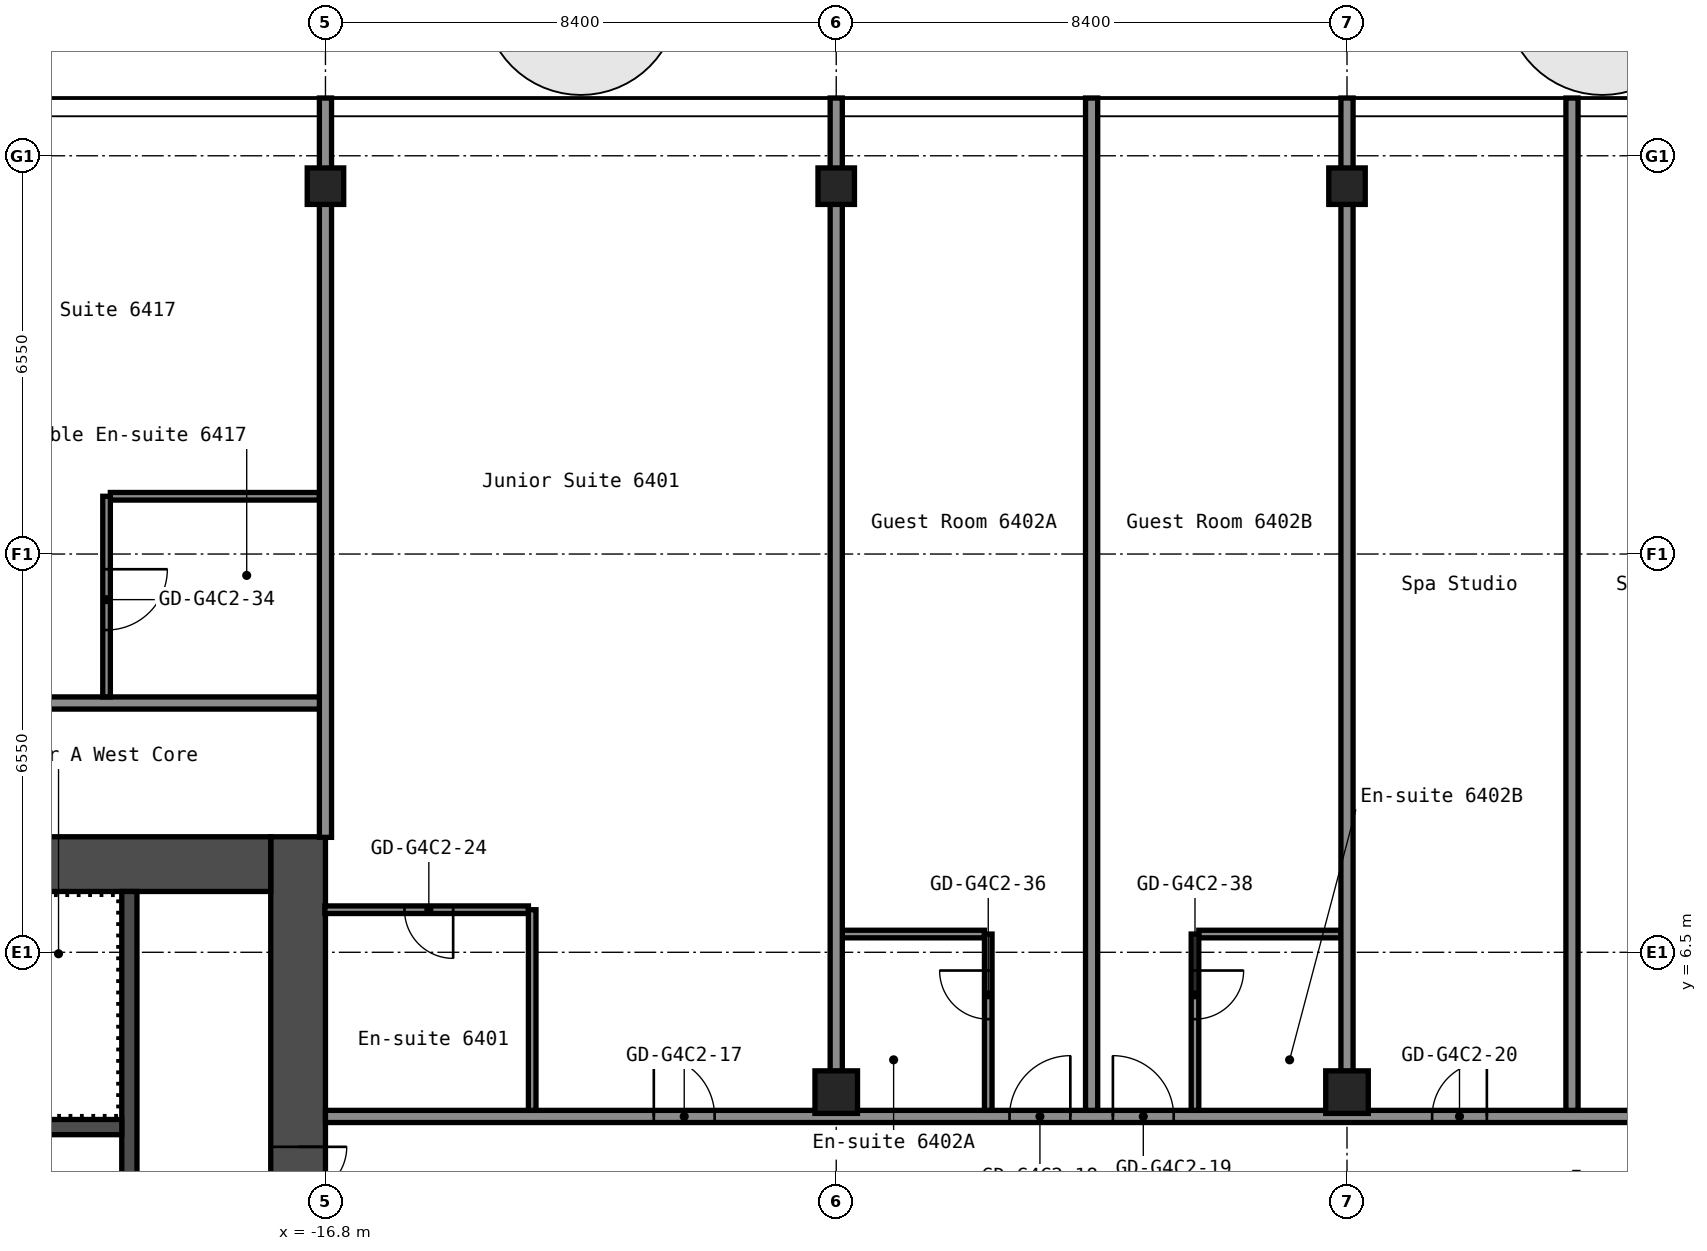
"""IFC4 building model, lengths in metres.
Left out: names, types, materials, properties, quantities, classifications, styles, units other than length and angle.
Written with IfcOpenShell. Run it as: python <this file> out.ifc"""

import sys

from ifc_helpers import new_model, si_unit, direction, frame, frame_2d, origin, origin_2d, place, context, subcontext, project, spatial, rectangle, hollow_rectangle, extrude, element, fill, save


model = new_model("IFC4")
c1 = context("Model", 3, precision=1e-05, world=origin(), true_north=direction((0.0, 1.0)))
c2 = subcontext(c1, "Body", "Model", "MODEL_VIEW")
j1 = project(units=[si_unit("LENGTHUNIT", "METRE"), si_unit("PLANEANGLEUNIT", "RADIAN")], contexts=[c1])
p1 = place(None, origin())
s1 = spatial("IfcSite", under=j1, at=p1, CompositionType="ELEMENT")
p2 = place(p1, origin())
s2 = spatial("IfcBuilding", under=s1, at=p2, CompositionType="ELEMENT")
p3 = place(p2, frame((0.0, 0.0, 225.0)))
s3 = spatial("IfcBuildingStorey", under=s2, at=p3, CompositionType="ELEMENT", Elevation=225.0)
p4 = place(p3, frame((-16.8, 19.1, 0.0), z_axis=(0.0, 0.0, 1.0), x_axis=(1.0, 0.0, 0.0)))
e1 = element("IfcColumn", 1, at=p4, inside=s3, PredefinedType="COLUMN", context=c2, shape_type="SweptSolid", body=[
    extrude(hollow_rectangle(XDim=0.6, YDim=0.6, WallThickness=0.025, InnerFilletRadius=0.038, OuterFilletRadius=0.062, at=origin_2d()), origin(), (0.0, 0.0, 1.0), 2.9),
])
p5 = place(p3, frame((-8.4, 4.2, 0.0), z_axis=(0.0, 0.0, 1.0), x_axis=(1.0, 0.0, 0.0)))
e2 = element("IfcColumn", 2, at=p5, inside=s3, PredefinedType="COLUMN", context=c2, shape_type="SweptSolid", body=[
    extrude(hollow_rectangle(XDim=0.7, YDim=0.7, WallThickness=0.028, at=origin_2d()), origin(), (0.0, 0.0, 1.0), 2.9),
])
p6 = place(p3, frame((-8.4, 19.1, 0.0), z_axis=(0.0, 0.0, 1.0), x_axis=(1.0, 0.0, 0.0)))
e3 = element("IfcColumn", 3, at=p6, inside=s3, PredefinedType="COLUMN", context=c2, shape_type="SweptSolid", body=[
    extrude(hollow_rectangle(XDim=0.6, YDim=0.6, WallThickness=0.025, InnerFilletRadius=0.038, OuterFilletRadius=0.062, at=origin_2d()), origin(), (0.0, 0.0, 1.0), 2.9),
])
p7 = place(p3, frame((0.0, 4.2, 0.0), z_axis=(0.0, 0.0, 1.0), x_axis=(1.0, 0.0, 0.0)))
e4 = element("IfcColumn", 4, at=p7, inside=s3, PredefinedType="COLUMN", context=c2, shape_type="SweptSolid", body=[
    extrude(hollow_rectangle(XDim=0.7, YDim=0.7, WallThickness=0.028, at=origin_2d()), origin(), (0.0, 0.0, 1.0), 2.9),
])
p8 = place(p3, frame((0.0, 19.1, 0.0), z_axis=(0.0, 0.0, 1.0), x_axis=(1.0, 0.0, 0.0)))
e5 = element("IfcColumn", 5, at=p8, inside=s3, PredefinedType="COLUMN", context=c2, shape_type="SweptSolid", body=[
    extrude(hollow_rectangle(XDim=0.6, YDim=0.6, WallThickness=0.025, InnerFilletRadius=0.038, OuterFilletRadius=0.062, at=origin_2d()), origin(), (0.0, 0.0, 1.0), 2.9),
])
p9 = place(p3, frame((-17.25, -8.4, 0.0), z_axis=(0.0, 0.0, 1.0), x_axis=(0.0, 1.0, 0.0)))
e6 = element("IfcWall", 6, at=p9, inside=s3, PredefinedType="SHEAR", context=c2, shape_type="SweptSolid", body=[
    extrude(rectangle(XDim=16.8, YDim=0.9, at=frame_2d((8.4, 0.0))), origin(), (0.0, 0.0, 1.0), 2.9),
])
p10 = place(p9, frame((10.1, 0.0, 0.0)))
e7 = element("IfcOpeningElement", 7, at=p10, cuts=e6, PredefinedType="OPENING", context=c2, shape_type="SweptSolid", body=[
    extrude(rectangle(XDim=1.6, YDim=2.1, at=frame_2d((0.8, 1.05))), frame((0.0, 0.46, 0.0), z_axis=(0.0, -1.0, 0.0), x_axis=(1.0, 0.0, 0.0)), (0.0, 0.0, 1.0), 0.92),
])
p11 = place(p3, frame((-32.7, 7.95, 0.0), z_axis=(0.0, 0.0, 1.0), x_axis=(1.0, 0.0, 0.0)))
e8 = element("IfcWall", 8, at=p11, inside=s3, PredefinedType="SHEAR", context=c2, shape_type="SweptSolid", body=[
    extrude(rectangle(XDim=15.0, YDim=0.9, at=frame_2d((7.5, 0.0))), origin(), (0.0, 0.0, 1.0), 2.9),
])
p12 = place(p11, frame((3.4, 0.0, 0.0)))
e9 = element("IfcOpeningElement", 9, at=p12, cuts=e8, PredefinedType="OPENING", context=c2, shape_type="SweptSolid", body=[
    extrude(rectangle(XDim=1.2, YDim=2.1, at=frame_2d((0.6, 1.05))), frame((0.0, 0.46, 0.0), z_axis=(0.0, -1.0, 0.0), x_axis=(1.0, 0.0, 0.0)), (0.0, 0.0, 1.0), 0.92),
])
p13 = place(p11, frame((0.75, 0.0, 0.0)))
e10 = element("IfcOpeningElement", 10, at=p13, cuts=e8, PredefinedType="OPENING", context=c2, shape_type="SweptSolid", body=[
    extrude(rectangle(XDim=0.9, YDim=2.1, at=frame_2d((0.45, 1.05))), frame((0.0, 0.46, 0.0), z_axis=(0.0, -1.0, 0.0), x_axis=(1.0, 0.0, 0.0)), (0.0, 0.0, 1.0), 0.92),
])
p14 = place(p3, frame((-20.025, 1.2, 0.0), z_axis=(0.0, 0.0, 1.0), x_axis=(0.0, 1.0, 0.0)))
e11 = element("IfcWall", 11, at=p14, inside=s3, PredefinedType="SHEAR", context=c2, shape_type="SweptSolid", body=[
    extrude(rectangle(XDim=6.3, YDim=0.25, at=frame_2d((3.15, 0.0))), origin(), (0.0, 0.0, 1.0), 2.9),
])
p15 = place(p3, frame((-27.65, 3.625, 0.0), z_axis=(0.0, 0.0, 1.0), x_axis=(1.0, 0.0, 0.0)))
e12 = element("IfcWall", 12, at=p15, inside=s3, PredefinedType="SHEAR", context=c2, shape_type="SweptSolid", body=[
    extrude(rectangle(XDim=7.5, YDim=0.25, at=frame_2d((3.75, 0.0))), origin(), (0.0, 0.0, 1.0), 2.9),
])
p16 = place(p3, frame((-16.8, 3.8, 0.0), z_axis=(0.0, 0.0, 1.0), x_axis=(1.0, 0.0, 0.0)))
e13 = element("IfcWall", 13, at=p16, inside=s3, PredefinedType="PARTITIONING", context=c2, shape_type="SweptSolid", body=[
    extrude(rectangle(XDim=33.6, YDim=0.2, at=frame_2d((16.8, 0.0))), origin(), (0.0, 0.0, 1.0), 2.9),
])
p17 = place(p16, frame((5.4, 0.0, 0.0)))
e14 = element("IfcOpeningElement", 14, at=p17, cuts=e13, PredefinedType="OPENING", context=c2, shape_type="SweptSolid", body=[
    extrude(rectangle(XDim=1.0, YDim=2.1, at=frame_2d((0.5, 1.05))), frame((0.0, 0.11, 0.0), z_axis=(0.0, -1.0, 0.0), x_axis=(1.0, 0.0, 0.0)), (0.0, 0.0, 1.0), 0.22),
])
p18 = place(p16, frame((11.25, 0.0, 0.0)))
e15 = element("IfcOpeningElement", 15, at=p18, cuts=e13, PredefinedType="OPENING", context=c2, shape_type="SweptSolid", body=[
    extrude(rectangle(XDim=1.0, YDim=2.1, at=frame_2d((0.5, 1.05))), frame((0.0, 0.11, 0.0), z_axis=(0.0, -1.0, 0.0), x_axis=(1.0, 0.0, 0.0)), (0.0, 0.0, 1.0), 0.22),
])
p19 = place(p16, frame((12.95, 0.0, 0.0)))
e16 = element("IfcOpeningElement", 16, at=p19, cuts=e13, PredefinedType="OPENING", context=c2, shape_type="SweptSolid", body=[
    extrude(rectangle(XDim=1.0, YDim=2.1, at=frame_2d((0.5, 1.05))), frame((0.0, 0.11, 0.0), z_axis=(0.0, -1.0, 0.0), x_axis=(1.0, 0.0, 0.0)), (0.0, 0.0, 1.0), 0.22),
])
p20 = place(p16, frame((18.2, 0.0, 0.0)))
e17 = element("IfcOpeningElement", 17, at=p20, cuts=e13, PredefinedType="OPENING", context=c2, shape_type="SweptSolid", body=[
    extrude(rectangle(XDim=0.9, YDim=2.1, at=frame_2d((0.45, 1.05))), frame((0.0, 0.11, 0.0), z_axis=(0.0, -1.0, 0.0), x_axis=(1.0, 0.0, 0.0)), (0.0, 0.0, 1.0), 0.22),
])
p21 = place(p16, frame((22.4, 0.0, 0.0)))
e18 = element("IfcOpeningElement", 18, at=p21, cuts=e13, PredefinedType="OPENING", context=c2, shape_type="SweptSolid", body=[
    extrude(rectangle(XDim=0.9, YDim=2.1, at=frame_2d((0.45, 1.05))), frame((0.0, 0.11, 0.0), z_axis=(0.0, -1.0, 0.0), x_axis=(1.0, 0.0, 0.0)), (0.0, 0.0, 1.0), 0.22),
])
p22 = place(p16, frame((28.05, 0.0, 0.0)))
e19 = element("IfcOpeningElement", 19, at=p22, cuts=e13, PredefinedType="OPENING", context=c2, shape_type="SweptSolid", body=[
    extrude(rectangle(XDim=1.0, YDim=2.1, at=frame_2d((0.5, 1.05))), frame((0.0, 0.11, 0.0), z_axis=(0.0, -1.0, 0.0), x_axis=(1.0, 0.0, 0.0)), (0.0, 0.0, 1.0), 0.22),
])
p23 = place(p16, frame((29.75, 0.0, 0.0)))
e20 = element("IfcOpeningElement", 20, at=p23, cuts=e13, PredefinedType="OPENING", context=c2, shape_type="SweptSolid", body=[
    extrude(rectangle(XDim=1.0, YDim=2.1, at=frame_2d((0.5, 1.05))), frame((0.0, 0.11, 0.0), z_axis=(0.0, -1.0, 0.0), x_axis=(1.0, 0.0, 0.0)), (0.0, 0.0, 1.0), 0.22),
])
p24 = place(p3, frame((-8.3, 6.8, 0.0), z_axis=(0.0, 0.0, 1.0), x_axis=(1.0, 0.0, 0.0)))
e21 = element("IfcWall", 21, at=p24, inside=s3, PredefinedType="PARTITIONING", context=c2, shape_type="SweptSolid", body=[
    extrude(rectangle(XDim=2.338, YDim=0.125, at=frame_2d((1.169, 0.0))), origin(), (0.0, 0.0, 1.0), 2.9),
])
p25 = place(p3, frame((-2.438, 6.8, 0.0), z_axis=(0.0, 0.0, 1.0), x_axis=(1.0, 0.0, 0.0)))
e22 = element("IfcWall", 22, at=p25, inside=s3, PredefinedType="PARTITIONING", context=c2, shape_type="SweptSolid", body=[
    extrude(rectangle(XDim=2.337, YDim=0.125, at=frame_2d((1.169, 0.0))), origin(), (0.0, 0.0, 1.0), 2.9),
])
p26 = place(p3, frame((-16.81, 7.2, 0.0), z_axis=(0.0, 0.0, 1.0), x_axis=(1.0, 0.0, 0.0)))
e23 = element("IfcWall", 23, at=p26, inside=s3, PredefinedType="PARTITIONING", context=c2, shape_type="SweptSolid", body=[
    extrude(rectangle(XDim=3.348, YDim=0.125, at=frame_2d((1.674, 0.0))), origin(), (0.0, 0.0, 1.0), 2.9),
])
p27 = place(p26, frame((1.31, 0.0, 0.0)))
e24 = element("IfcOpeningElement", 24, at=p27, cuts=e23, PredefinedType="OPENING", context=c2, shape_type="SweptSolid", body=[
    extrude(rectangle(XDim=0.8, YDim=2.1, at=frame_2d((0.4, 1.05))), frame((0.0, 0.073, 0.0), z_axis=(0.0, -1.0, 0.0), x_axis=(1.0, 0.0, 0.0)), (0.0, 0.0, 1.0), 0.145),
])
p28 = place(p3, frame((-38.1, 10.6, 0.0), z_axis=(0.0, 0.0, 1.0), x_axis=(1.0, 0.0, 0.0)))
e25 = element("IfcWall", 25, at=p28, inside=s3, PredefinedType="PARTITIONING", context=c2, shape_type="SweptSolid", body=[
    extrude(rectangle(XDim=21.3, YDim=0.2, at=frame_2d((10.65, 0.0))), origin(), (0.0, 0.0, 1.0), 2.9),
])
p29 = place(p28, frame((1.95, 0.0, 0.0)))
e26 = element("IfcOpeningElement", 26, at=p29, cuts=e25, PredefinedType="OPENING", context=c2, shape_type="SweptSolid", body=[
    extrude(rectangle(XDim=0.9, YDim=2.1, at=frame_2d((0.45, 1.05))), frame((0.0, 0.11, 0.0), z_axis=(0.0, -1.0, 0.0), x_axis=(1.0, 0.0, 0.0)), (0.0, 0.0, 1.0), 0.22),
])
p30 = place(p28, frame((6.5, 0.0, 0.0)))
e27 = element("IfcOpeningElement", 27, at=p30, cuts=e25, PredefinedType="OPENING", context=c2, shape_type="SweptSolid", body=[
    extrude(rectangle(XDim=1.0, YDim=2.1, at=frame_2d((0.5, 1.05))), frame((0.0, 0.11, 0.0), z_axis=(0.0, -1.0, 0.0), x_axis=(1.0, 0.0, 0.0)), (0.0, 0.0, 1.0), 0.22),
])
p31 = place(p28, frame((14.8, 0.0, 0.0)))
e28 = element("IfcOpeningElement", 28, at=p31, cuts=e25, PredefinedType="OPENING", context=c2, shape_type="SweptSolid", body=[
    extrude(rectangle(XDim=1.0, YDim=2.1, at=frame_2d((0.5, 1.05))), frame((0.0, 0.11, 0.0), z_axis=(0.0, -1.0, 0.0), x_axis=(1.0, 0.0, 0.0)), (0.0, 0.0, 1.0), 0.22),
])
p32 = place(p3, frame((-20.337, 14.0, 0.0), z_axis=(0.0, 0.0, 1.0), x_axis=(1.0, 0.0, 0.0)))
e29 = element("IfcWall", 29, at=p32, inside=s3, PredefinedType="PARTITIONING", context=c2, shape_type="SweptSolid", body=[
    extrude(rectangle(XDim=3.438, YDim=0.125, at=frame_2d((1.719, 0.0))), origin(), (0.0, 0.0, 1.0), 2.9),
])
p33 = place(p3, frame((-20.4, 10.7, 0.0), z_axis=(0.0, 0.0, 1.0), x_axis=(0.0, 1.0, 0.0)))
e30 = element("IfcWall", 30, at=p33, inside=s3, PredefinedType="PARTITIONING", context=c2, shape_type="SweptSolid", body=[
    extrude(rectangle(XDim=3.3, YDim=0.125, at=frame_2d((1.65, 0.0))), origin(), (0.0, 0.0, 1.0), 2.9),
])
p34 = place(p33, frame((1.1, 0.0, 0.0)))
e31 = element("IfcOpeningElement", 31, at=p34, cuts=e30, PredefinedType="OPENING", context=c2, shape_type="SweptSolid", body=[
    extrude(rectangle(XDim=1.0, YDim=2.1, at=frame_2d((0.5, 1.05))), frame((0.0, 0.073, 0.0), z_axis=(0.0, -1.0, 0.0), x_axis=(1.0, 0.0, 0.0)), (0.0, 0.0, 1.0), 0.145),
])
p35 = place(p3, frame((-16.8, 8.39, 0.0), z_axis=(0.0, 0.0, 1.0), x_axis=(0.0, 1.0, 0.0)))
e32 = element("IfcWall", 32, at=p35, inside=s3, PredefinedType="PARTITIONING", context=c2, shape_type="SweptSolid", body=[
    extrude(rectangle(XDim=12.16, YDim=0.2, at=frame_2d((6.08, 0.0))), origin(), (0.0, 0.0, 1.0), 2.9),
])
p36 = place(p3, frame((-13.4, 3.9, 0.0), z_axis=(0.0, 0.0, 1.0), x_axis=(0.0, 1.0, 0.0)))
e33 = element("IfcWall", 33, at=p36, inside=s3, PredefinedType="PARTITIONING", context=c2, shape_type="SweptSolid", body=[
    extrude(rectangle(XDim=3.3, YDim=0.125, at=frame_2d((1.65, 0.0))), origin(), (0.0, 0.0, 1.0), 2.9),
])
p37 = place(p3, frame((-8.4, 4.54, 0.0), z_axis=(0.0, 0.0, 1.0), x_axis=(0.0, 1.0, 0.0)))
e34 = element("IfcWall", 34, at=p37, inside=s3, PredefinedType="PARTITIONING", context=c2, shape_type="SweptSolid", body=[
    extrude(rectangle(XDim=16.01, YDim=0.2, at=frame_2d((8.005, 0.0))), origin(), (0.0, 0.0, 1.0), 2.9),
])
p38 = place(p3, frame((-5.9, 3.9, 0.0), z_axis=(0.0, 0.0, 1.0), x_axis=(0.0, 1.0, 0.0)))
e35 = element("IfcWall", 35, at=p38, inside=s3, PredefinedType="PARTITIONING", context=c2, shape_type="SweptSolid", body=[
    extrude(rectangle(XDim=2.9, YDim=0.125, at=frame_2d((1.45, 0.0))), origin(), (0.0, 0.0, 1.0), 2.9),
])
p39 = place(p38, frame((1.5, 0.0, 0.0)))
e36 = element("IfcOpeningElement", 36, at=p39, cuts=e35, PredefinedType="OPENING", context=c2, shape_type="SweptSolid", body=[
    extrude(rectangle(XDim=0.8, YDim=2.1, at=frame_2d((0.4, 1.05))), frame((0.0, 0.073, 0.0), z_axis=(0.0, -1.0, 0.0), x_axis=(1.0, 0.0, 0.0)), (0.0, 0.0, 1.0), 0.145),
])
p40 = place(p3, frame((-4.2, 3.9, 0.0), z_axis=(0.0, 0.0, 1.0), x_axis=(0.0, 1.0, 0.0)))
e37 = element("IfcWall", 37, at=p40, inside=s3, PredefinedType="PARTITIONING", context=c2, shape_type="SweptSolid", body=[
    extrude(rectangle(XDim=16.65, YDim=0.2, at=frame_2d((8.325, 0.0))), origin(), (0.0, 0.0, 1.0), 2.9),
])
p41 = place(p3, frame((-2.5, 3.9, 0.0), z_axis=(0.0, 0.0, 1.0), x_axis=(0.0, 1.0, 0.0)))
e38 = element("IfcWall", 38, at=p41, inside=s3, PredefinedType="PARTITIONING", context=c2, shape_type="SweptSolid", body=[
    extrude(rectangle(XDim=2.9, YDim=0.125, at=frame_2d((1.45, 0.0))), origin(), (0.0, 0.0, 1.0), 2.9),
])
p42 = place(p41, frame((1.5, 0.0, 0.0)))
e39 = element("IfcOpeningElement", 39, at=p42, cuts=e38, PredefinedType="OPENING", context=c2, shape_type="SweptSolid", body=[
    extrude(rectangle(XDim=0.8, YDim=2.1, at=frame_2d((0.4, 1.05))), frame((0.0, 0.073, 0.0), z_axis=(0.0, -1.0, 0.0), x_axis=(1.0, 0.0, 0.0)), (0.0, 0.0, 1.0), 0.145),
])
p43 = place(p3, frame((0.0, 4.54, 0.0), z_axis=(0.0, 0.0, 1.0), x_axis=(0.0, 1.0, 0.0)))
e40 = element("IfcWall", 40, at=p43, inside=s3, PredefinedType="PARTITIONING", context=c2, shape_type="SweptSolid", body=[
    extrude(rectangle(XDim=16.01, YDim=0.2, at=frame_2d((8.005, 0.0))), origin(), (0.0, 0.0, 1.0), 2.9),
])
p44 = place(p3, frame((3.7, 3.9, 0.0), z_axis=(0.0, 0.0, 1.0), x_axis=(0.0, 1.0, 0.0)))
e41 = element("IfcWall", 41, at=p44, inside=s3, PredefinedType="PARTITIONING", context=c2, shape_type="SweptSolid", body=[
    extrude(rectangle(XDim=16.65, YDim=0.2, at=frame_2d((8.325, 0.0))), origin(), (0.0, 0.0, 1.0), 2.9),
])
p45 = place(p10, origin())
e42 = element("IfcDoor", 42, at=p45, inside=s3, OperationType="DOUBLE_DOOR_SINGLE_SWING", PredefinedType="DOOR", context=c2, shape_type="SweptSolid", body=[
    extrude(rectangle(XDim=1.6, YDim=2.1, at=frame_2d((0.8, 1.05))), frame((0.0, 0.025, 0.0), z_axis=(0.0, -1.0, 0.0), x_axis=(1.0, 0.0, 0.0)), (0.0, 0.0, 1.0), 0.05),
])
fill(e7, e42)
p46 = place(p17, origin())
e43 = element("IfcDoor", 43, at=p46, inside=s3, OperationType="SINGLE_SWING_RIGHT", PredefinedType="DOOR", context=c2, shape_type="SweptSolid", body=[
    extrude(rectangle(XDim=1.0, YDim=2.1, at=frame_2d((0.5, 1.05))), frame((0.0, 0.025, 0.0), z_axis=(0.0, -1.0, 0.0), x_axis=(1.0, 0.0, 0.0)), (0.0, 0.0, 1.0), 0.05),
])
fill(e14, e43)
p47 = place(p18, origin())
e44 = element("IfcDoor", 44, at=p47, inside=s3, OperationType="SINGLE_SWING_LEFT", PredefinedType="DOOR", context=c2, shape_type="SweptSolid", body=[
    extrude(rectangle(XDim=1.0, YDim=2.1, at=frame_2d((0.5, 1.05))), frame((0.0, 0.025, 0.0), z_axis=(0.0, -1.0, 0.0), x_axis=(1.0, 0.0, 0.0)), (0.0, 0.0, 1.0), 0.05),
])
fill(e15, e44)
p48 = place(p19, origin())
e45 = element("IfcDoor", 45, at=p48, inside=s3, OperationType="SINGLE_SWING_RIGHT", PredefinedType="DOOR", context=c2, shape_type="SweptSolid", body=[
    extrude(rectangle(XDim=1.0, YDim=2.1, at=frame_2d((0.5, 1.05))), frame((0.0, 0.025, 0.0), z_axis=(0.0, -1.0, 0.0), x_axis=(1.0, 0.0, 0.0)), (0.0, 0.0, 1.0), 0.05),
])
fill(e16, e45)
p49 = place(p20, origin())
e46 = element("IfcDoor", 46, at=p49, inside=s3, OperationType="SINGLE_SWING_LEFT", PredefinedType="DOOR", context=c2, shape_type="SweptSolid", body=[
    extrude(rectangle(XDim=0.9, YDim=2.1, at=frame_2d((0.45, 1.05))), frame((0.0, 0.025, 0.0), z_axis=(0.0, -1.0, 0.0), x_axis=(1.0, 0.0, 0.0)), (0.0, 0.0, 1.0), 0.05),
])
fill(e17, e46)
p50 = place(p27, origin())
e47 = element("IfcDoor", 47, at=p50, inside=s3, OperationType="SINGLE_SWING_RIGHT", PredefinedType="DOOR", context=c2, shape_type="SweptSolid", body=[
    extrude(rectangle(XDim=0.8, YDim=2.1, at=frame_2d((0.4, 1.05))), frame((0.0, 0.025, 0.0), z_axis=(0.0, -1.0, 0.0), x_axis=(1.0, 0.0, 0.0)), (0.0, 0.0, 1.0), 0.05),
])
fill(e24, e47)
p51 = place(p34, origin())
e48 = element("IfcDoor", 48, at=p51, inside=s3, OperationType="SINGLE_SWING_RIGHT", PredefinedType="DOOR", context=c2, shape_type="SweptSolid", body=[
    extrude(rectangle(XDim=1.0, YDim=2.1, at=frame_2d((0.5, 1.05))), frame((0.0, 0.025, 0.0), z_axis=(0.0, -1.0, 0.0), x_axis=(1.0, 0.0, 0.0)), (0.0, 0.0, 1.0), 0.05),
])
fill(e31, e48)
p52 = place(p39, origin())
e49 = element("IfcDoor", 49, at=p52, inside=s3, OperationType="SINGLE_SWING_LEFT", PredefinedType="DOOR", context=c2, shape_type="SweptSolid", body=[
    extrude(rectangle(XDim=0.8, YDim=2.1, at=frame_2d((0.4, 1.05))), frame((0.0, 0.025, 0.0), z_axis=(0.0, -1.0, 0.0), x_axis=(1.0, 0.0, 0.0)), (0.0, 0.0, 1.0), 0.05),
])
fill(e36, e49)
p53 = place(p42, origin())
e50 = element("IfcDoor", 50, at=p53, inside=s3, OperationType="SINGLE_SWING_RIGHT", PredefinedType="DOOR", context=c2, shape_type="SweptSolid", body=[
    extrude(rectangle(XDim=0.8, YDim=2.1, at=frame_2d((0.4, 1.05))), frame((0.0, 0.025, 0.0), z_axis=(0.0, -1.0, 0.0), x_axis=(1.0, 0.0, 0.0)), (0.0, 0.0, 1.0), 0.05),
])
fill(e39, e50)
save(model, sys.argv[1])
